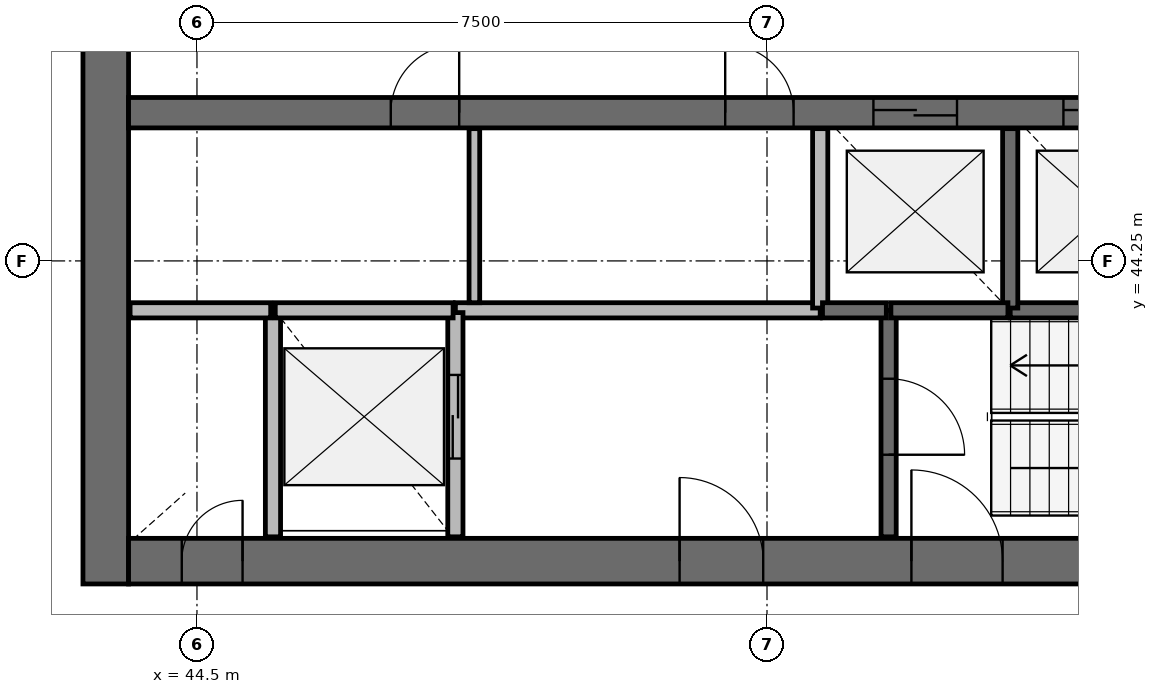
"""IFC4 building model, lengths in metres.
Left out: names, types, materials, properties, quantities, classifications, styles, units other than length and angle.
Written with IfcOpenShell. Run it as: python <this file> out.ifc"""

import sys

from ifc_helpers import new_model, si_unit, direction, frame, frame_2d, origin, place, context, subcontext, project, spatial, rectangle, extrude, source, transform, mapped, element, fill, save


model = new_model("IFC4")
c1 = context("Model", 3, precision=1e-05, world=origin(), true_north=direction((0.0, 1.0)))
c2 = subcontext(c1, "Body", "Model", "MODEL_VIEW")
j1 = project(units=[si_unit("LENGTHUNIT", "METRE"), si_unit("PLANEANGLEUNIT", "RADIAN")], contexts=[c1])
p1 = place(None, origin())
s1 = spatial("IfcSite", under=j1, at=p1, CompositionType="ELEMENT")
p2 = place(p1, origin())
s2 = spatial("IfcBuilding", under=s1, at=p2, CompositionType="ELEMENT")
p3 = place(p2, frame((0.0, 0.0, 242.3)))
s3 = spatial("IfcBuildingStorey", under=s2, at=p3, CompositionType="ELEMENT", Elevation=242.3)
p4 = place(p3, frame((43.3, 56.0, 0.0), z_axis=(0.0, 0.0, 1.0), x_axis=(0.0, -1.0, 0.0)))
e1 = element("IfcWall", 1, at=p4, inside=s3, PredefinedType="SHEAR", context=c2, shape_type="SweptSolid", body=[
    extrude(rectangle(XDim=16.0, YDim=0.6, at=frame_2d((8.0, 0.0))), origin(), (0.0, 0.0, 1.0), 3.9),
])
p5 = place(p4, frame((7.1, 0.0, 0.0)))
e2 = element("IfcOpeningElement", 2, at=p5, cuts=e1, PredefinedType="OPENING", context=c2, shape_type="SweptSolid", body=[
    extrude(rectangle(XDim=1.8, YDim=2.1, at=frame_2d((0.9, 1.05))), frame((0.0, 0.31, 0.0), z_axis=(0.0, -1.0, 0.0), x_axis=(1.0, 0.0, 0.0)), (0.0, 0.0, 1.0), 0.62),
])
p6 = place(p3, frame((43.6, 40.3, 0.0), z_axis=(0.0, 0.0, 1.0), x_axis=(1.0, 0.0, 0.0)))
e3 = element("IfcWall", 3, at=p6, inside=s3, PredefinedType="SHEAR", context=c2, shape_type="SweptSolid", body=[
    extrude(rectangle(XDim=16.8, YDim=0.6, at=frame_2d((8.4, 0.0))), origin(), (0.0, 0.0, 1.0), 3.9),
])
p7 = place(p6, frame((10.3, 0.0, 0.0)))
e4 = element("IfcOpeningElement", 4, at=p7, cuts=e3, PredefinedType="OPENING", context=c2, shape_type="SweptSolid", body=[
    extrude(rectangle(XDim=1.2, YDim=2.1, at=frame_2d((0.6, 1.05))), frame((0.0, 0.31, 0.0), z_axis=(0.0, -1.0, 0.0), x_axis=(1.0, 0.0, 0.0)), (0.0, 0.0, 1.0), 0.62),
])
p8 = place(p6, frame((7.25, 0.0, 0.0)))
e5 = element("IfcOpeningElement", 5, at=p8, cuts=e3, PredefinedType="OPENING", context=c2, shape_type="SweptSolid", body=[
    extrude(rectangle(XDim=1.1, YDim=2.1, at=frame_2d((0.55, 1.05))), frame((0.0, 0.31, 0.0), z_axis=(0.0, -1.0, 0.0), x_axis=(1.0, 0.0, 0.0)), (0.0, 0.0, 1.0), 0.62),
])
p9 = place(p6, frame((0.7, 0.0, 0.0)))
e6 = element("IfcOpeningElement", 6, at=p9, cuts=e3, PredefinedType="OPENING", context=c2, shape_type="SweptSolid", body=[
    extrude(rectangle(XDim=0.8, YDim=2.1, at=frame_2d((0.4, 1.05))), frame((0.0, 0.31, 0.0), z_axis=(0.0, -1.0, 0.0), x_axis=(1.0, 0.0, 0.0)), (0.0, 0.0, 1.0), 0.62),
])
p10 = place(p3, frame((43.6, 46.2, 0.0), z_axis=(0.0, 0.0, 1.0), x_axis=(1.0, 0.0, 0.0)))
e7 = element("IfcWall", 7, at=p10, inside=s3, PredefinedType="SHEAR", context=c2, shape_type="SweptSolid", body=[
    extrude(rectangle(XDim=16.8, YDim=0.4, at=frame_2d((8.4, 0.0))), origin(), (0.0, 0.0, 1.0), 3.9),
])
p11 = place(p10, frame((9.8, 0.0, 0.0)))
e8 = element("IfcOpeningElement", 8, at=p11, cuts=e7, PredefinedType="OPENING", context=c2, shape_type="SweptSolid", body=[
    extrude(rectangle(XDim=1.1, YDim=2.1, at=frame_2d((0.55, 1.05))), frame((0.0, 0.21, 0.0), z_axis=(0.0, -1.0, 0.0), x_axis=(1.0, 0.0, 0.0)), (0.0, 0.0, 1.0), 0.42),
])
p12 = place(p10, frame((12.3, 0.0, 0.0)))
e9 = element("IfcOpeningElement", 9, at=p12, cuts=e7, PredefinedType="OPENING", context=c2, shape_type="SweptSolid", body=[
    extrude(rectangle(XDim=1.1, YDim=2.1, at=frame_2d((0.55, 1.05))), frame((0.0, 0.21, 0.0), z_axis=(0.0, -1.0, 0.0), x_axis=(1.0, 0.0, 0.0)), (0.0, 0.0, 1.0), 0.42),
])
p13 = place(p10, frame((14.8, 0.0, 0.0)))
e10 = element("IfcOpeningElement", 10, at=p13, cuts=e7, PredefinedType="OPENING", context=c2, shape_type="SweptSolid", body=[
    extrude(rectangle(XDim=1.1, YDim=2.1, at=frame_2d((0.55, 1.05))), frame((0.0, 0.21, 0.0), z_axis=(0.0, -1.0, 0.0), x_axis=(1.0, 0.0, 0.0)), (0.0, 0.0, 1.0), 0.42),
])
p14 = place(p10, frame((3.45, 0.0, 0.0)))
e11 = element("IfcOpeningElement", 11, at=p14, cuts=e7, PredefinedType="OPENING", context=c2, shape_type="SweptSolid", body=[
    extrude(rectangle(XDim=0.9, YDim=2.1, at=frame_2d((0.45, 1.05))), frame((0.0, 0.21, 0.0), z_axis=(0.0, -1.0, 0.0), x_axis=(1.0, 0.0, 0.0)), (0.0, 0.0, 1.0), 0.42),
])
p15 = place(p10, frame((7.85, 0.0, 0.0)))
e12 = element("IfcOpeningElement", 12, at=p15, cuts=e7, PredefinedType="OPENING", context=c2, shape_type="SweptSolid", body=[
    extrude(rectangle(XDim=0.9, YDim=2.1, at=frame_2d((0.45, 1.05))), frame((0.0, 0.21, 0.0), z_axis=(0.0, -1.0, 0.0), x_axis=(1.0, 0.0, 0.0)), (0.0, 0.0, 1.0), 0.42),
])
p16 = place(p3, frame((52.7, 43.6, 0.0), z_axis=(0.0, 0.0, 1.0), x_axis=(-1.0, 0.0, 0.0)))
e13 = element("IfcWall", 13, at=p16, inside=s3, PredefinedType="SOLIDWALL", context=c2, shape_type="SweptSolid", body=[
    extrude(rectangle(XDim=4.8, YDim=0.2, at=frame_2d((2.4, 0.0))), origin(), (0.0, 0.0, 1.0), 3.58),
])
p17 = place(p3, frame((45.5, 43.6, 0.0), z_axis=(0.0, 0.0, 1.0), x_axis=(0.0, -1.0, 0.0)))
e14 = element("IfcWall", 14, at=p17, inside=s3, PredefinedType="SOLIDWALL", context=c2, shape_type="SweptSolid", body=[
    extrude(rectangle(XDim=2.98, YDim=0.2, at=frame_2d((1.49, 0.0))), origin(), (0.0, 0.0, 1.0), 3.58),
])
p18 = place(p3, frame((47.9, 40.62, 0.0), z_axis=(0.0, 0.0, 1.0), x_axis=(0.0, 1.0, 0.0)))
e15 = element("IfcWall", 15, at=p18, inside=s3, PredefinedType="SOLIDWALL", context=c2, shape_type="SweptSolid", body=[
    extrude(rectangle(XDim=2.95, YDim=0.2, at=frame_2d((1.475, 0.0))), origin(), (0.0, 0.0, 1.0), 3.58),
])
p19 = place(p18, frame((1.03, 0.0, 0.0)))
e16 = element("IfcOpeningElement", 16, at=p19, cuts=e15, PredefinedType="OPENING", context=c2, shape_type="SweptSolid", body=[
    extrude(rectangle(XDim=1.1, YDim=2.1, at=frame_2d((0.55, 1.05))), frame((0.0, 0.11, 0.0), z_axis=(0.0, -1.0, 0.0), x_axis=(1.0, 0.0, 0.0)), (0.0, 0.0, 1.0), 0.22),
])
p20 = place(p3, frame((53.6, 43.6, 0.0), z_axis=(0.0, 0.0, 1.0), x_axis=(0.0, -1.0, 0.0)))
e17 = element("IfcWall", 17, at=p20, inside=s3, PredefinedType="SOLIDWALL", context=c2, shape_type="SweptSolid", body=[
    extrude(rectangle(XDim=2.98, YDim=0.2, at=frame_2d((1.49, 0.0))), origin(), (0.0, 0.0, 1.0), 3.58),
])
p21 = place(p20, frame((0.9, 0.0, 0.0)))
e18 = element("IfcOpeningElement", 18, at=p21, cuts=e17, PredefinedType="OPENING", context=c2, shape_type="SweptSolid", body=[
    extrude(rectangle(XDim=1.0, YDim=2.1, at=frame_2d((0.5, 1.05))), frame((0.0, 0.11, 0.0), z_axis=(0.0, -1.0, 0.0), x_axis=(1.0, 0.0, 0.0)), (0.0, 0.0, 1.0), 0.22),
])
p22 = place(p3, frame((55.2, 43.6, 0.0), z_axis=(0.0, 0.0, 1.0), x_axis=(1.0, 0.0, 0.0)))
e19 = element("IfcWall", 19, at=p22, inside=s3, PredefinedType="SOLIDWALL", context=c2, shape_type="SweptSolid", body=[
    extrude(rectangle(XDim=2.47, YDim=0.2, at=frame_2d((1.235, 0.0))), origin(), (0.0, 0.0, 1.0), 3.58),
])
p23 = place(p3, frame((47.87, 43.6, 0.0), z_axis=(0.0, 0.0, 1.0), x_axis=(-1.0, 0.0, 0.0)))
e20 = element("IfcWall", 20, at=p23, inside=s3, PredefinedType="SOLIDWALL", context=c2, shape_type="SweptSolid", body=[
    extrude(rectangle(XDim=2.34, YDim=0.2, at=frame_2d((1.17, 0.0))), origin(), (0.0, 0.0, 1.0), 3.58),
])
for number, where, z_axis, x_axis in (
    (21, (52.7, 45.99, 0.0), (0.0, 0.0, 1.0), (0.0, -1.0, 0.0)),
    (22, (55.2, 43.63, 0.0), (0.0, 0.0, 1.0), (0.0, 1.0, 0.0)),
):
    element("IfcWall", number, at=place(p3, frame(where, z_axis=z_axis, x_axis=x_axis)), inside=s3, PredefinedType="SOLIDWALL", context=c2, shape_type="SweptSolid", body=[
        extrude(rectangle(XDim=2.36, YDim=0.2, at=frame_2d((1.18, 0.0))), origin(), (0.0, 0.0, 1.0), 3.58),
    ])
p24 = place(p3, frame((45.47, 43.6, 0.0), z_axis=(0.0, 0.0, 1.0), x_axis=(-1.0, 0.0, 0.0)))
e23 = element("IfcWall", 23, at=p24, inside=s3, PredefinedType="SOLIDWALL", context=c2, shape_type="SweptSolid", body=[
    extrude(rectangle(XDim=1.85, YDim=0.2, at=frame_2d((0.925, 0.0))), origin(), (0.0, 0.0, 1.0), 3.58),
])
p25 = place(p3, frame((53.63, 43.6, 0.0), z_axis=(0.0, 0.0, 1.0), x_axis=(1.0, 0.0, 0.0)))
e24 = element("IfcWall", 24, at=p25, inside=s3, PredefinedType="SOLIDWALL", context=c2, shape_type="SweptSolid", body=[
    extrude(rectangle(XDim=1.54, YDim=0.2, at=frame_2d((0.77, 0.0))), origin(), (0.0, 0.0, 1.0), 3.58),
])
p26 = place(p3, frame((52.73, 43.6, 0.0), z_axis=(0.0, 0.0, 1.0), x_axis=(1.0, 0.0, 0.0)))
e25 = element("IfcWall", 25, at=p26, inside=s3, PredefinedType="SOLIDWALL", context=c2, shape_type="SweptSolid", body=[
    extrude(rectangle(XDim=0.84, YDim=0.2, at=frame_2d((0.42, 0.0))), origin(), (0.0, 0.0, 1.0), 3.58),
])
p27 = place(p3, frame((48.15, 43.7, 0.0), z_axis=(0.0, 0.0, 1.0), x_axis=(0.0, 1.0, 0.0)))
e26 = element("IfcWall", 26, at=p27, inside=s3, PredefinedType="PARTITIONING", context=c2, shape_type="SweptSolid", body=[
    extrude(rectangle(XDim=2.29, YDim=0.14, at=frame_2d((1.145, 0.0))), origin(), (0.0, 0.0, 1.0), 2.88),
])
m1 = source(origin(), c2, "Body", "SweptSolid", [
    extrude(rectangle(XDim=1.1, YDim=2.1, at=frame_2d((0.55, 1.05))), frame((0.0, 0.025, 0.0), z_axis=(0.0, -1.0, 0.0), x_axis=(1.0, 0.0, 0.0)), (0.0, 0.0, 1.0), 0.05),
])
p28 = place(p11, origin())
e27 = element("IfcDoor", 27, at=p28, inside=s3, OperationType="DOUBLE_DOOR_SLIDING", PredefinedType="USERDEFINED", context=c2, shape_type="MappedRepresentation", body=[
    mapped(m1, transform((0.0, 0.0, 0.0), scale=1.0)),
])
fill(e8, e27)
p29 = place(p12, origin())
e28 = element("IfcDoor", 28, at=p29, inside=s3, OperationType="DOUBLE_DOOR_SLIDING", PredefinedType="USERDEFINED", context=c2, shape_type="MappedRepresentation", body=[
    mapped(m1, transform((0.0, 0.0, 0.0), scale=1.0)),
])
fill(e9, e28)
p30 = place(p19, origin())
e29 = element("IfcDoor", 29, at=p30, inside=s3, OperationType="DOUBLE_DOOR_SLIDING", PredefinedType="USERDEFINED", context=c2, shape_type="MappedRepresentation", body=[
    mapped(m1, transform((0.0, 0.0, 0.0), scale=1.0)),
])
fill(e16, e29)
m2 = source(origin(), c2, "Body", "SweptSolid", [
    extrude(rectangle(XDim=1.2, YDim=2.1, at=frame_2d((0.6, 1.05))), frame((0.0, 0.025, 0.0), z_axis=(0.0, -1.0, 0.0), x_axis=(1.0, 0.0, 0.0)), (0.0, 0.0, 1.0), 0.05),
])
p31 = place(p7, origin())
e30 = element("IfcDoor", 30, at=p31, inside=s3, OperationType="SINGLE_SWING_LEFT", PredefinedType="DOOR", context=c2, shape_type="MappedRepresentation", body=[
    mapped(m2, transform((0.0, 0.0, 0.0), scale=1.0)),
])
fill(e4, e30)
m3 = source(origin(), c2, "Body", "SweptSolid", [
    extrude(rectangle(XDim=1.0, YDim=2.1, at=frame_2d((0.5, 1.05))), frame((0.0, 0.025, 0.0), z_axis=(0.0, -1.0, 0.0), x_axis=(1.0, 0.0, 0.0)), (0.0, 0.0, 1.0), 0.05),
])
p32 = place(p21, origin())
e31 = element("IfcDoor", 31, at=p32, inside=s3, OperationType="SINGLE_SWING_RIGHT", PredefinedType="DOOR", context=c2, shape_type="MappedRepresentation", body=[
    mapped(m3, transform((0.0, 0.0, 0.0), scale=1.0)),
])
fill(e18, e31)
m4 = source(origin(), c2, "Body", "SweptSolid", [
    extrude(rectangle(XDim=1.1, YDim=2.1, at=frame_2d((0.55, 1.05))), frame((0.0, 0.025, 0.0), z_axis=(0.0, -1.0, 0.0), x_axis=(1.0, 0.0, 0.0)), (0.0, 0.0, 1.0), 0.05),
])
p33 = place(p8, origin())
e32 = element("IfcDoor", 32, at=p33, inside=s3, OperationType="SINGLE_SWING_LEFT", PredefinedType="DOOR", context=c2, shape_type="MappedRepresentation", body=[
    mapped(m4, transform((0.0, 0.0, 0.0), scale=1.0)),
])
fill(e5, e32)
m5 = source(origin(), c2, "Body", "SweptSolid", [
    extrude(rectangle(XDim=0.8, YDim=2.1, at=frame_2d((0.4, 1.05))), frame((0.0, 0.025, 0.0), z_axis=(0.0, -1.0, 0.0), x_axis=(1.0, 0.0, 0.0)), (0.0, 0.0, 1.0), 0.05),
])
p34 = place(p9, origin())
e33 = element("IfcDoor", 33, at=p34, inside=s3, OperationType="SINGLE_SWING_RIGHT", PredefinedType="DOOR", context=c2, shape_type="MappedRepresentation", body=[
    mapped(m5, transform((0.0, 0.0, 0.0), scale=1.0)),
])
fill(e6, e33)
m6 = source(origin(), c2, "Body", "SweptSolid", [
    extrude(rectangle(XDim=0.9, YDim=2.1, at=frame_2d((0.45, 1.05))), frame((0.0, 0.025, 0.0), z_axis=(0.0, -1.0, 0.0), x_axis=(1.0, 0.0, 0.0)), (0.0, 0.0, 1.0), 0.05),
])
p35 = place(p14, origin())
e34 = element("IfcDoor", 34, at=p35, inside=s3, OperationType="SINGLE_SWING_RIGHT", PredefinedType="DOOR", context=c2, shape_type="MappedRepresentation", body=[
    mapped(m6, transform((0.0, 0.0, 0.0), scale=1.0)),
])
fill(e11, e34)
p36 = place(p15, origin())
e35 = element("IfcDoor", 35, at=p36, inside=s3, OperationType="SINGLE_SWING_LEFT", PredefinedType="DOOR", context=c2, shape_type="MappedRepresentation", body=[
    mapped(m6, transform((0.0, 0.0, 0.0), scale=1.0)),
])
fill(e12, e35)
save(model, sys.argv[1])
